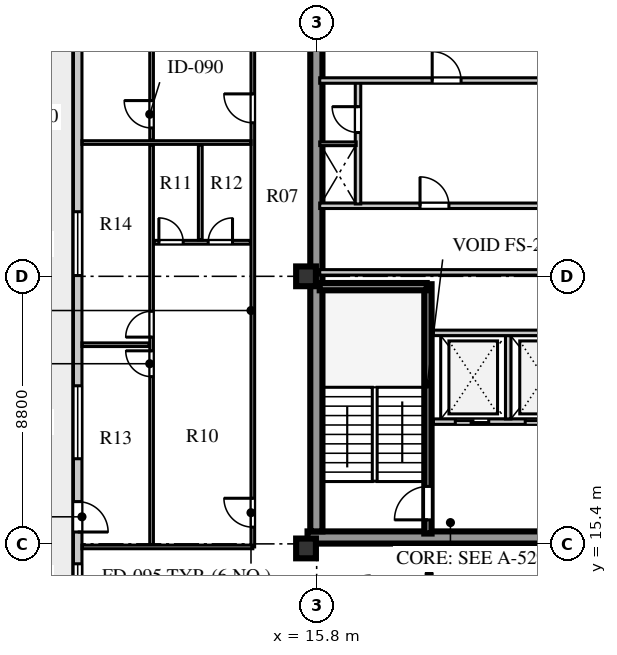
"""IFC4 building model, lengths in metres.
Left out: names, types, materials, properties, quantities, classifications, styles, units other than length and angle.
Written with IfcOpenShell. Run it as: python <this file> out.ifc"""

import sys

from ifc_helpers import new_model, si_unit, direction, frame, frame_2d, origin, origin_2d, place, context, subcontext, project, spatial, rectangle, extrude, element, fill, save


model = new_model("IFC4")
c1 = context("Model", 3, precision=1e-05, world=origin(), true_north=direction((0.0, 1.0)))
c2 = subcontext(c1, "Body", "Model", "MODEL_VIEW")
j1 = project(units=[si_unit("LENGTHUNIT", "METRE"), si_unit("PLANEANGLEUNIT", "RADIAN")], contexts=[c1])
p1 = place(None, origin())
s1 = spatial("IfcSite", under=j1, at=p1, CompositionType="ELEMENT")
p2 = place(p1, origin())
s2 = spatial("IfcBuilding", under=s1, at=p2, CompositionType="ELEMENT")
p3 = place(p2, frame((0.0, 0.0, 221.9)))
s3 = spatial("IfcBuildingStorey", under=s2, at=p3, CompositionType="ELEMENT", Elevation=221.9)
p4 = place(p3, frame((15.5, 15.61, 0.0), z_axis=(0.0, 0.0, 1.0), x_axis=(1.0, 0.0, 0.0)))
e1 = element("IfcWall", 1, at=p4, inside=s3, PredefinedType="SHEAR", context=c2, shape_type="SweptSolid", body=[
    extrude(rectangle(XDim=9.48, YDim=0.4, at=frame_2d((4.74, 0.0))), origin(), (0.0, 0.0, 1.0), 3.66),
])
p5 = place(p3, frame((15.79, 15.81, 0.0), z_axis=(0.0, 0.0, 1.0), x_axis=(0.0, 1.0, 0.0)))
e2 = element("IfcWall", 2, at=p5, inside=s3, PredefinedType="SHEAR", context=c2, shape_type="SweptSolid", body=[
    extrude(rectangle(XDim=25.63, YDim=0.4, at=frame_2d((12.815, 0.0))), origin(), (0.0, 0.0, 1.0), 3.66),
])
for number, where, z_axis, x_axis in (
    (3, (15.45, 15.25, 0.0), (0.0, 0.0, 1.0), (1.0, 0.0, 0.0)),
    (4, (15.45, 24.2, 0.0), (0.0, 0.0, 1.0), (1.0, 0.0, 0.0)),
):
    element("IfcColumn", number, at=place(p3, frame(where, z_axis=z_axis, x_axis=x_axis)), inside=s3, PredefinedType="COLUMN", context=c2, shape_type="SweptSolid", body=[
        extrude(rectangle(XDim=0.65, YDim=0.65, at=origin_2d()), origin(), (0.0, 0.0, 1.0), 3.66),
    ])
p6 = place(p3, frame((7.94, 44.07, 0.0), z_axis=(0.0, 0.0, 1.0), x_axis=(0.0, -1.0, 0.0)))
e5 = element("IfcWall", 5, at=p6, inside=s3, PredefinedType="STANDARD", context=c2, shape_type="SweptSolid", body=[
    extrude(rectangle(XDim=30.94, YDim=0.28, at=frame_2d((15.47, 0.0))), origin(), (0.0, 0.0, 1.0), 3.66),
])
p7 = place(p6, frame((29.325, 0.0, 0.8)))
e6 = element("IfcOpeningElement", 6, at=p7, cuts=e5, PredefinedType="OPENING", context=c2, shape_type="SweptSolid", body=[
    extrude(rectangle(XDim=0.95, YDim=1.65, at=frame_2d((0.475, 0.825))), frame((0.0, 0.15, 0.0), z_axis=(0.0, -1.0, 0.0), x_axis=(1.0, 0.0, 0.0)), (0.0, 0.0, 1.0), 0.3),
])
p8 = place(p6, frame((27.28, 0.0, 0.0)))
e7 = element("IfcOpeningElement", 7, at=p8, cuts=e5, PredefinedType="OPENING", context=c2, shape_type="SweptSolid", body=[
    extrude(rectangle(XDim=1.0, YDim=2.05, at=frame_2d((0.5, 1.025))), frame((0.0, 0.15, 0.0), z_axis=(0.0, -1.0, 0.0), x_axis=(1.0, 0.0, 0.0)), (0.0, 0.0, 1.0), 0.3),
])
p9 = place(p6, frame((23.47, 0.0, 0.8)))
e8 = element("IfcOpeningElement", 8, at=p9, cuts=e5, PredefinedType="OPENING", context=c2, shape_type="SweptSolid", body=[
    extrude(rectangle(XDim=2.4, YDim=2.05, at=frame_2d((1.2, 1.025))), frame((0.0, 0.15, 0.0), z_axis=(0.0, -1.0, 0.0), x_axis=(1.0, 0.0, 0.0)), (0.0, 0.0, 1.0), 0.3),
])
p10 = place(p6, frame((17.745, 0.0, 0.8)))
e9 = element("IfcOpeningElement", 9, at=p10, cuts=e5, PredefinedType="OPENING", context=c2, shape_type="SweptSolid", body=[
    extrude(rectangle(XDim=2.1, YDim=1.95, at=frame_2d((1.05, 0.975))), frame((0.0, 0.15, 0.0), z_axis=(0.0, -1.0, 0.0), x_axis=(1.0, 0.0, 0.0)), (0.0, 0.0, 1.0), 0.3),
])
p11 = place(p6, frame((8.145, 0.0, 0.8)))
e10 = element("IfcOpeningElement", 10, at=p11, cuts=e5, PredefinedType="OPENING", context=c2, shape_type="SweptSolid", body=[
    extrude(rectangle(XDim=1.35, YDim=1.9, at=frame_2d((0.675, 0.95))), frame((0.0, 0.15, 0.0), z_axis=(0.0, -1.0, 0.0), x_axis=(1.0, 0.0, 0.0)), (0.0, 0.0, 1.0), 0.3),
])
p12 = place(p6, frame((0.665, 0.0, 0.8)))
e11 = element("IfcOpeningElement", 11, at=p12, cuts=e5, PredefinedType="OPENING", context=c2, shape_type="SweptSolid", body=[
    extrude(rectangle(XDim=0.95, YDim=1.65, at=frame_2d((0.475, 0.825))), frame((0.0, 0.15, 0.0), z_axis=(0.0, -1.0, 0.0), x_axis=(1.0, 0.0, 0.0)), (0.0, 0.0, 1.0), 0.3),
])
p13 = place(p3, frame((19.46, 15.74, 0.0), z_axis=(0.0, 0.0, 1.0), x_axis=(0.0, 1.0, 0.0)))
e12 = element("IfcWall", 12, at=p13, inside=s3, PredefinedType="SHEAR", context=c2, shape_type="SweptSolid", body=[
    extrude(rectangle(XDim=8.2, YDim=0.24, at=frame_2d((4.1, 0.0))), origin(), (0.0, 0.0, 1.0), 3.9),
])
p14 = place(p13, frame((0.45, 0.0, 0.0)))
e13 = element("IfcOpeningElement", 13, at=p14, cuts=e12, PredefinedType="OPENING", context=c2, shape_type="SweptSolid", body=[
    extrude(rectangle(XDim=1.1, YDim=2.1, at=frame_2d((0.55, 1.05))), frame((0.0, 0.13, 0.0), z_axis=(0.0, -1.0, 0.0), x_axis=(1.0, 0.0, 0.0)), (0.0, 0.0, 1.0), 0.26),
])
p15 = place(p3, frame((15.9, 23.86, 0.0), z_axis=(0.0, 0.0, 1.0), x_axis=(1.0, 0.0, 0.0)))
e14 = element("IfcWall", 14, at=p15, inside=s3, PredefinedType="SHEAR", context=c2, shape_type="SweptSolid", body=[
    extrude(rectangle(XDim=3.52, YDim=0.24, at=frame_2d((1.76, 0.0))), origin(), (0.0, 0.0, 1.0), 3.9),
])
p16 = place(p3, frame((19.64, 19.42, 0.0), z_axis=(0.0, 0.0, 1.0), x_axis=(1.0, 0.0, 0.0)))
e15 = element("IfcWall", 15, at=p16, inside=s3, PredefinedType="SOLIDWALL", context=c2, shape_type="SweptSolid", body=[
    extrude(rectangle(XDim=4.94, YDim=0.18, at=frame_2d((2.47, 0.0))), origin(), (0.0, 0.0, 1.0), 3.66),
])
p17 = place(p16, frame((0.72, 0.0, 0.0)))
e16 = element("IfcOpeningElement", 16, at=p17, cuts=e15, PredefinedType="OPENING", context=c2, shape_type="SweptSolid", body=[
    extrude(rectangle(XDim=1.1, YDim=2.1, at=frame_2d((0.55, 1.05))), frame((0.0, 0.1, 0.0), z_axis=(0.0, -1.0, 0.0), x_axis=(1.0, 0.0, 0.0)), (0.0, 0.0, 1.0), 0.2),
])
p18 = place(p16, frame((3.02, 0.0, 0.0)))
e17 = element("IfcOpeningElement", 17, at=p18, cuts=e15, PredefinedType="OPENING", context=c2, shape_type="SweptSolid", body=[
    extrude(rectangle(XDim=1.1, YDim=2.1, at=frame_2d((0.55, 1.05))), frame((0.0, 0.1, 0.0), z_axis=(0.0, -1.0, 0.0), x_axis=(1.0, 0.0, 0.0)), (0.0, 0.0, 1.0), 0.2),
])
p19 = place(p3, frame((22.1, 19.51, 0.0), z_axis=(0.0, 0.0, 1.0), x_axis=(0.0, 1.0, 0.0)))
e18 = element("IfcWall", 18, at=p19, inside=s3, PredefinedType="SOLIDWALL", context=c2, shape_type="SweptSolid", body=[
    extrude(rectangle(XDim=2.74, YDim=0.18, at=frame_2d((1.37, 0.0))), origin(), (0.0, 0.0, 1.0), 3.66),
])
p20 = place(p3, frame((19.64, 22.34, 0.0), z_axis=(0.0, 0.0, 1.0), x_axis=(1.0, 0.0, 0.0)))
e19 = element("IfcWall", 19, at=p20, inside=s3, PredefinedType="SOLIDWALL", context=c2, shape_type="SweptSolid", body=[
    extrude(rectangle(XDim=4.94, YDim=0.18, at=frame_2d((2.47, 0.0))), origin(), (0.0, 0.0, 1.0), 3.66),
])
p21 = place(p3, frame((15.9, 26.52, 0.0), z_axis=(0.0, 0.0, 1.0), x_axis=(1.0, 0.0, 0.0)))
e20 = element("IfcWall", 20, at=p21, inside=s3, PredefinedType="SOLIDWALL", context=c2, shape_type="SweptSolid", body=[
    extrude(rectangle(XDim=8.68, YDim=0.18, at=frame_2d((4.34, 0.0))), origin(), (0.0, 0.0, 1.0), 3.66),
])
p22 = place(p21, frame((3.3, 0.0, 0.0)))
e21 = element("IfcOpeningElement", 21, at=p22, cuts=e20, PredefinedType="OPENING", context=c2, shape_type="SweptSolid", body=[
    extrude(rectangle(XDim=0.95, YDim=2.1, at=frame_2d((0.475, 1.05))), frame((0.0, 0.1, 0.0), z_axis=(0.0, -1.0, 0.0), x_axis=(1.0, 0.0, 0.0)), (0.0, 0.0, 1.0), 0.2),
])
p23 = place(p3, frame((15.9, 24.33, 0.0), z_axis=(0.0, 0.0, 1.0), x_axis=(1.0, 0.0, 0.0)))
e22 = element("IfcWall", 22, at=p23, inside=s3, PredefinedType="SOLIDWALL", context=c2, shape_type="SweptSolid", body=[
    extrude(rectangle(XDim=8.68, YDim=0.18, at=frame_2d((4.34, 0.0))), origin(), (0.0, 0.0, 1.0), 3.06),
])
p24 = place(p3, frame((17.16, 26.58, 0.0), z_axis=(0.0, 0.0, 1.0), x_axis=(0.0, 1.0, 0.0)))
e23 = element("IfcWall", 23, at=p24, inside=s3, PredefinedType="SOLIDWALL", context=c2, shape_type="SweptSolid", body=[
    extrude(rectangle(XDim=4.02, YDim=0.18, at=frame_2d((2.01, 0.0))), origin(), (0.0, 0.0, 1.0), 3.66),
])
p25 = place(p24, frame((2.35, 0.0, 0.0)))
e24 = element("IfcOpeningElement", 24, at=p25, cuts=e23, PredefinedType="OPENING", context=c2, shape_type="SweptSolid", body=[
    extrude(rectangle(XDim=0.85, YDim=2.06, at=frame_2d((0.425, 1.03))), frame((0.0, 0.1, 0.0), z_axis=(0.0, -1.0, 0.0), x_axis=(1.0, 0.0, 0.0)), (0.0, 0.0, 1.0), 0.2),
])
p26 = place(p3, frame((15.9, 28.56, 0.0), z_axis=(0.0, 0.0, 1.0), x_axis=(1.0, 0.0, 0.0)))
e25 = element("IfcWall", 25, at=p26, inside=s3, PredefinedType="PARTITIONING", context=c2, shape_type="SweptSolid", body=[
    extrude(rectangle(XDim=1.2, YDim=0.12, at=frame_2d((0.6, 0.0))), origin(), (0.0, 0.0, 1.0), 3.66),
])
p27 = place(p3, frame((15.9, 30.64, 0.0), z_axis=(0.0, 0.0, 1.0), x_axis=(1.0, 0.0, 0.0)))
e26 = element("IfcWall", 26, at=p27, inside=s3, PredefinedType="SOLIDWALL", context=c2, shape_type="SweptSolid", body=[
    extrude(rectangle(XDim=8.68, YDim=0.18, at=frame_2d((4.34, 0.0))), origin(), (0.0, 0.0, 1.0), 3.66),
])
p28 = place(p27, frame((3.7, 0.0, 0.0)))
e27 = element("IfcOpeningElement", 27, at=p28, cuts=e26, PredefinedType="OPENING", context=c2, shape_type="SweptSolid", body=[
    extrude(rectangle(XDim=0.95, YDim=2.1, at=frame_2d((0.475, 1.05))), frame((0.0, 0.1, 0.0), z_axis=(0.0, -1.0, 0.0), x_axis=(1.0, 0.0, 0.0)), (0.0, 0.0, 1.0), 0.2),
])
p29 = place(p3, frame((13.7, 15.3, 0.0), z_axis=(0.0, 0.0, 1.0), x_axis=(0.0, 1.0, 0.0)))
e28 = element("IfcWall", 28, at=p29, inside=s3, PredefinedType="PARTITIONING", context=c2, shape_type="SweptSolid", body=[
    extrude(rectangle(XDim=26.6, YDim=0.12, at=frame_2d((13.3, 0.0))), origin(), (0.0, 0.0, 1.0), 3.66),
])
p30 = place(p29, frame((0.65, 0.0, 0.0)))
e29 = element("IfcOpeningElement", 29, at=p30, cuts=e28, PredefinedType="OPENING", context=c2, shape_type="SweptSolid", body=[
    extrude(rectangle(XDim=0.95, YDim=2.1, at=frame_2d((0.475, 1.05))), frame((0.0, 0.07, 0.0), z_axis=(0.0, -1.0, 0.0), x_axis=(1.0, 0.0, 0.0)), (0.0, 0.0, 1.0), 0.14),
])
p31 = place(p29, frame((13.95, 0.0, 0.0)))
e30 = element("IfcOpeningElement", 30, at=p31, cuts=e28, PredefinedType="OPENING", context=c2, shape_type="SweptSolid", body=[
    extrude(rectangle(XDim=0.95, YDim=2.1, at=frame_2d((0.475, 1.05))), frame((0.0, 0.07, 0.0), z_axis=(0.0, -1.0, 0.0), x_axis=(1.0, 0.0, 0.0)), (0.0, 0.0, 1.0), 0.14),
])
p32 = place(p3, frame((8.08, 15.3, 0.0), z_axis=(0.0, 0.0, 1.0), x_axis=(1.0, 0.0, 0.0)))
e31 = element("IfcWall", 31, at=p32, inside=s3, PredefinedType="PARTITIONING", context=c2, shape_type="SweptSolid", body=[
    extrude(rectangle(XDim=5.62, YDim=0.12, at=frame_2d((2.81, 0.0))), origin(), (0.0, 0.0, 1.0), 3.21),
])
p33 = place(p3, frame((10.37, 15.38, 0.0), z_axis=(0.0, 0.0, 1.0), x_axis=(0.0, 1.0, 0.0)))
e32 = element("IfcWall", 32, at=p33, inside=s3, PredefinedType="PARTITIONING", context=c2, shape_type="SweptSolid", body=[
    extrude(rectangle(XDim=13.14, YDim=0.12, at=frame_2d((6.57, 0.0))), origin(), (0.0, 0.0, 1.0), 3.66),
])
p34 = place(p33, frame((5.52, 0.0, 0.0)))
e33 = element("IfcOpeningElement", 33, at=p34, cuts=e32, PredefinedType="OPENING", context=c2, shape_type="SweptSolid", body=[
    extrude(rectangle(XDim=0.85, YDim=2.08, at=frame_2d((0.425, 1.04))), frame((0.0, 0.07, 0.0), z_axis=(0.0, -1.0, 0.0), x_axis=(1.0, 0.0, 0.0)), (0.0, 0.0, 1.0), 0.14),
])
p35 = place(p33, frame((6.82, 0.0, 0.0)))
e34 = element("IfcOpeningElement", 34, at=p35, cuts=e32, PredefinedType="OPENING", context=c2, shape_type="SweptSolid", body=[
    extrude(rectangle(XDim=0.85, YDim=2.08, at=frame_2d((0.425, 1.04))), frame((0.0, 0.07, 0.0), z_axis=(0.0, -1.0, 0.0), x_axis=(1.0, 0.0, 0.0)), (0.0, 0.0, 1.0), 0.14),
])
p36 = place(p3, frame((10.45, 25.32, 0.0), z_axis=(0.0, 0.0, 1.0), x_axis=(1.0, 0.0, 0.0)))
e35 = element("IfcWall", 35, at=p36, inside=s3, PredefinedType="PLUMBINGWALL", context=c2, shape_type="SweptSolid", body=[
    extrude(rectangle(XDim=3.17, YDim=0.125, at=frame_2d((1.585, 0.0))), origin(), (0.0, 0.0, 1.0), 3.66),
])
p37 = place(p36, frame((0.16, 0.0, 0.0)))
e36 = element("IfcOpeningElement", 36, at=p37, cuts=e35, PredefinedType="OPENING", context=c2, shape_type="SweptSolid", body=[
    extrude(rectangle(XDim=0.8, YDim=2.05, at=frame_2d((0.4, 1.025))), frame((0.0, 0.073, 0.0), z_axis=(0.0, -1.0, 0.0), x_axis=(1.0, 0.0, 0.0)), (0.0, 0.0, 1.0), 0.145),
])
p38 = place(p36, frame((1.782, 0.0, 0.0)))
e37 = element("IfcOpeningElement", 37, at=p38, cuts=e35, PredefinedType="OPENING", context=c2, shape_type="SweptSolid", body=[
    extrude(rectangle(XDim=0.8, YDim=2.05, at=frame_2d((0.4, 1.025))), frame((0.0, 0.073, 0.0), z_axis=(0.0, -1.0, 0.0), x_axis=(1.0, 0.0, 0.0)), (0.0, 0.0, 1.0), 0.145),
])
p39 = place(p3, frame((11.972, 25.4, 0.0), z_axis=(0.0, 0.0, 1.0), x_axis=(0.0, 1.0, 0.0)))
e38 = element("IfcWall", 38, at=p39, inside=s3, PredefinedType="PLUMBINGWALL", context=c2, shape_type="SweptSolid", body=[
    extrude(rectangle(XDim=3.12, YDim=0.125, at=frame_2d((1.56, 0.0))), origin(), (0.0, 0.0, 1.0), 3.66),
])
p40 = place(p3, frame((8.08, 21.95, 0.0), z_axis=(0.0, 0.0, 1.0), x_axis=(1.0, 0.0, 0.0)))
e39 = element("IfcWall", 39, at=p40, inside=s3, PredefinedType="PARTITIONING", context=c2, shape_type="SweptSolid", body=[
    extrude(rectangle(XDim=2.21, YDim=0.12, at=frame_2d((1.105, 0.0))), origin(), (0.0, 0.0, 1.0), 3.66),
])
p41 = place(p3, frame((8.08, 28.6, 0.0), z_axis=(0.0, 0.0, 1.0), x_axis=(1.0, 0.0, 0.0)))
e40 = element("IfcWall", 40, at=p41, inside=s3, PredefinedType="PARTITIONING", context=c2, shape_type="SweptSolid", body=[
    extrude(rectangle(XDim=5.56, YDim=0.12, at=frame_2d((2.78, 0.0))), origin(), (0.0, 0.0, 1.0), 3.66),
])
p42 = place(p3, frame((10.37, 28.68, 0.0), z_axis=(0.0, 0.0, 1.0), x_axis=(0.0, 1.0, 0.0)))
e41 = element("IfcWall", 41, at=p42, inside=s3, PredefinedType="PARTITIONING", context=c2, shape_type="SweptSolid", body=[
    extrude(rectangle(XDim=13.14, YDim=0.12, at=frame_2d((6.57, 0.0))), origin(), (0.0, 0.0, 1.0), 3.66),
])
p43 = place(p42, frame((0.4, 0.0, 0.0)))
e42 = element("IfcOpeningElement", 42, at=p43, cuts=e41, PredefinedType="OPENING", context=c2, shape_type="SweptSolid", body=[
    extrude(rectangle(XDim=0.9, YDim=2.08, at=frame_2d((0.45, 1.04))), frame((0.0, 0.07, 0.0), z_axis=(0.0, -1.0, 0.0), x_axis=(1.0, 0.0, 0.0)), (0.0, 0.0, 1.0), 0.14),
])
p44 = place(p7, origin())
e43 = element("IfcWindow", 43, at=p44, inside=s3, PartitioningType="SINGLE_PANEL", PredefinedType="WINDOW", context=c2, shape_type="SweptSolid", body=[
    extrude(rectangle(XDim=0.95, YDim=1.65, at=frame_2d((0.475, 0.825))), frame((0.0, 0.03, 0.0), z_axis=(0.0, -1.0, 0.0), x_axis=(1.0, 0.0, 0.0)), (0.0, 0.0, 1.0), 0.06),
])
fill(e6, e43)
p45 = place(p8, frame((1.0, 0.0, 0.0), z_axis=(0.0, 0.0, 1.0), x_axis=(-1.0, 0.0, 0.0)))
e44 = element("IfcDoor", 44, at=p45, inside=s3, OperationType="SINGLE_SWING_LEFT", PredefinedType="DOOR", context=c2, shape_type="SweptSolid", body=[
    extrude(rectangle(XDim=1.0, YDim=2.05, at=frame_2d((0.5, 1.025))), frame((0.0, 0.025, 0.0), z_axis=(0.0, -1.0, 0.0), x_axis=(1.0, 0.0, 0.0)), (0.0, 0.0, 1.0), 0.05),
])
fill(e7, e44)
p46 = place(p9, origin())
e45 = element("IfcWindow", 45, at=p46, inside=s3, PartitioningType="SINGLE_PANEL", PredefinedType="WINDOW", context=c2, shape_type="SweptSolid", body=[
    extrude(rectangle(XDim=2.4, YDim=2.05, at=frame_2d((1.2, 1.025))), frame((0.0, 0.03, 0.0), z_axis=(0.0, -1.0, 0.0), x_axis=(1.0, 0.0, 0.0)), (0.0, 0.0, 1.0), 0.06),
])
fill(e8, e45)
p47 = place(p10, origin())
e46 = element("IfcWindow", 46, at=p47, inside=s3, PartitioningType="SINGLE_PANEL", PredefinedType="WINDOW", context=c2, shape_type="SweptSolid", body=[
    extrude(rectangle(XDim=2.1, YDim=1.95, at=frame_2d((1.05, 0.975))), frame((0.0, 0.03, 0.0), z_axis=(0.0, -1.0, 0.0), x_axis=(1.0, 0.0, 0.0)), (0.0, 0.0, 1.0), 0.06),
])
fill(e9, e46)
p48 = place(p14, origin())
e47 = element("IfcDoor", 47, at=p48, inside=s3, OperationType="SINGLE_SWING_LEFT", PredefinedType="DOOR", context=c2, shape_type="SweptSolid", body=[
    extrude(rectangle(XDim=1.1, YDim=2.1, at=frame_2d((0.55, 1.05))), frame((0.0, 0.025, 0.0), z_axis=(0.0, -1.0, 0.0), x_axis=(1.0, 0.0, 0.0)), (0.0, 0.0, 1.0), 0.05),
])
fill(e13, e47)
p49 = place(p17, origin())
e48 = element("IfcDoor", 48, at=p49, inside=s3, OperationType="DOUBLE_DOOR_SLIDING", PredefinedType="DOOR", context=c2, shape_type="SweptSolid", body=[
    extrude(rectangle(XDim=1.1, YDim=2.1, at=frame_2d((0.55, 1.05))), frame((0.0, 0.025, 0.0), z_axis=(0.0, -1.0, 0.0), x_axis=(1.0, 0.0, 0.0)), (0.0, 0.0, 1.0), 0.05),
])
fill(e16, e48)
p50 = place(p18, origin())
e49 = element("IfcDoor", 49, at=p50, inside=s3, OperationType="DOUBLE_DOOR_SLIDING", PredefinedType="DOOR", context=c2, shape_type="SweptSolid", body=[
    extrude(rectangle(XDim=1.1, YDim=2.1, at=frame_2d((0.55, 1.05))), frame((0.0, 0.025, 0.0), z_axis=(0.0, -1.0, 0.0), x_axis=(1.0, 0.0, 0.0)), (0.0, 0.0, 1.0), 0.05),
])
fill(e17, e49)
p51 = place(p22, origin())
e50 = element("IfcDoor", 50, at=p51, inside=s3, OperationType="SINGLE_SWING_LEFT", PredefinedType="DOOR", context=c2, shape_type="SweptSolid", body=[
    extrude(rectangle(XDim=0.95, YDim=2.1, at=frame_2d((0.475, 1.05))), frame((0.0, 0.025, 0.0), z_axis=(0.0, -1.0, 0.0), x_axis=(1.0, 0.0, 0.0)), (0.0, 0.0, 1.0), 0.05),
])
fill(e21, e50)
p52 = place(p25, origin())
e51 = element("IfcDoor", 51, at=p52, inside=s3, OperationType="SINGLE_SWING_RIGHT", PredefinedType="DOOR", context=c2, shape_type="SweptSolid", body=[
    extrude(rectangle(XDim=0.85, YDim=2.06, at=frame_2d((0.425, 1.03))), frame((0.0, 0.025, 0.0), z_axis=(0.0, -1.0, 0.0), x_axis=(1.0, 0.0, 0.0)), (0.0, 0.0, 1.0), 0.05),
])
fill(e24, e51)
p53 = place(p28, frame((0.95, 0.0, 0.0), z_axis=(0.0, 0.0, 1.0), x_axis=(-1.0, 0.0, 0.0)))
e52 = element("IfcDoor", 52, at=p53, inside=s3, OperationType="SINGLE_SWING_RIGHT", PredefinedType="DOOR", context=c2, shape_type="SweptSolid", body=[
    extrude(rectangle(XDim=0.95, YDim=2.1, at=frame_2d((0.475, 1.05))), frame((0.0, 0.025, 0.0), z_axis=(0.0, -1.0, 0.0), x_axis=(1.0, 0.0, 0.0)), (0.0, 0.0, 1.0), 0.05),
])
fill(e27, e52)
p54 = place(p37, origin())
e53 = element("IfcDoor", 53, at=p54, inside=s3, OperationType="SINGLE_SWING_LEFT", PredefinedType="DOOR", context=c2, shape_type="SweptSolid", body=[
    extrude(rectangle(XDim=0.8, YDim=2.05, at=frame_2d((0.4, 1.025))), frame((0.0, 0.025, 0.0), z_axis=(0.0, -1.0, 0.0), x_axis=(1.0, 0.0, 0.0)), (0.0, 0.0, 1.0), 0.05),
])
fill(e36, e53)
p55 = place(p38, origin())
e54 = element("IfcDoor", 54, at=p55, inside=s3, OperationType="SINGLE_SWING_RIGHT", PredefinedType="DOOR", context=c2, shape_type="SweptSolid", body=[
    extrude(rectangle(XDim=0.8, YDim=2.05, at=frame_2d((0.4, 1.025))), frame((0.0, 0.025, 0.0), z_axis=(0.0, -1.0, 0.0), x_axis=(1.0, 0.0, 0.0)), (0.0, 0.0, 1.0), 0.05),
])
fill(e37, e54)
p56 = place(p34, frame((0.85, 0.0, 0.0), z_axis=(0.0, 0.0, 1.0), x_axis=(-1.0, 0.0, 0.0)))
e55 = element("IfcDoor", 55, at=p56, inside=s3, OperationType="SINGLE_SWING_LEFT", PredefinedType="DOOR", context=c2, shape_type="SweptSolid", body=[
    extrude(rectangle(XDim=0.85, YDim=2.08, at=frame_2d((0.425, 1.04))), frame((0.0, 0.025, 0.0), z_axis=(0.0, -1.0, 0.0), x_axis=(1.0, 0.0, 0.0)), (0.0, 0.0, 1.0), 0.05),
])
fill(e33, e55)
p57 = place(p35, frame((0.85, 0.0, 0.0), z_axis=(0.0, 0.0, 1.0), x_axis=(-1.0, 0.0, 0.0)))
e56 = element("IfcDoor", 56, at=p57, inside=s3, OperationType="SINGLE_SWING_RIGHT", PredefinedType="DOOR", context=c2, shape_type="SweptSolid", body=[
    extrude(rectangle(XDim=0.85, YDim=2.08, at=frame_2d((0.425, 1.04))), frame((0.0, 0.025, 0.0), z_axis=(0.0, -1.0, 0.0), x_axis=(1.0, 0.0, 0.0)), (0.0, 0.0, 1.0), 0.05),
])
fill(e34, e56)
p58 = place(p30, frame((0.95, 0.0, 0.0), z_axis=(0.0, 0.0, 1.0), x_axis=(-1.0, 0.0, 0.0)))
e57 = element("IfcDoor", 57, at=p58, inside=s3, OperationType="SINGLE_SWING_LEFT", PredefinedType="DOOR", context=c2, shape_type="SweptSolid", body=[
    extrude(rectangle(XDim=0.95, YDim=2.1, at=frame_2d((0.475, 1.05))), frame((0.0, 0.025, 0.0), z_axis=(0.0, -1.0, 0.0), x_axis=(1.0, 0.0, 0.0)), (0.0, 0.0, 1.0), 0.05),
])
fill(e29, e57)
p59 = place(p43, frame((0.9, 0.0, 0.0), z_axis=(0.0, 0.0, 1.0), x_axis=(-1.0, 0.0, 0.0)))
e58 = element("IfcDoor", 58, at=p59, inside=s3, OperationType="SINGLE_SWING_LEFT", PredefinedType="DOOR", context=c2, shape_type="SweptSolid", body=[
    extrude(rectangle(XDim=0.9, YDim=2.08, at=frame_2d((0.45, 1.04))), frame((0.0, 0.025, 0.0), z_axis=(0.0, -1.0, 0.0), x_axis=(1.0, 0.0, 0.0)), (0.0, 0.0, 1.0), 0.05),
])
fill(e42, e58)
p60 = place(p31, frame((0.95, 0.0, 0.0), z_axis=(0.0, 0.0, 1.0), x_axis=(-1.0, 0.0, 0.0)))
e59 = element("IfcDoor", 59, at=p60, inside=s3, OperationType="SINGLE_SWING_LEFT", PredefinedType="DOOR", context=c2, shape_type="SweptSolid", body=[
    extrude(rectangle(XDim=0.95, YDim=2.1, at=frame_2d((0.475, 1.05))), frame((0.0, 0.025, 0.0), z_axis=(0.0, -1.0, 0.0), x_axis=(1.0, 0.0, 0.0)), (0.0, 0.0, 1.0), 0.05),
])
fill(e30, e59)
save(model, sys.argv[1])
